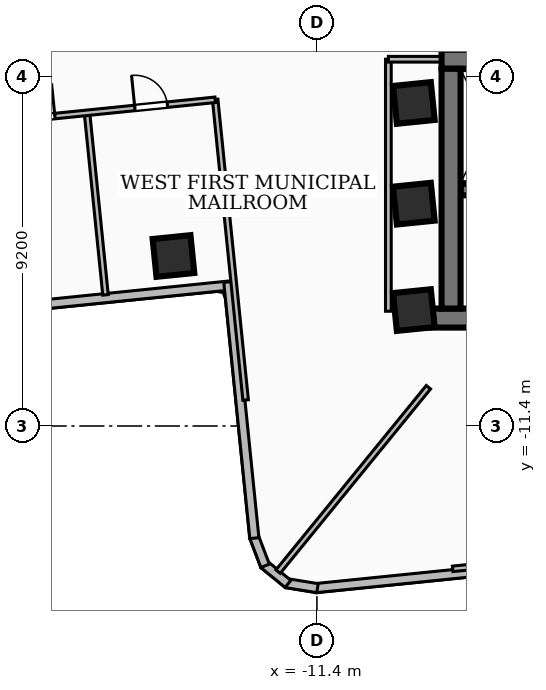
"""IFC4 building model, lengths in metres.
Left out: names, types, materials, properties, quantities, classifications, styles, units other than length and angle.
Written with IfcOpenShell. Run it as: python <this file> out.ifc"""

import sys

from ifc_helpers import new_model, si_unit, direction, frame, frame_2d, origin, origin_2d, place, context, subcontext, project, spatial, rectangle, extrude, element, fill, save


model = new_model("IFC4")
c1 = context("Model", 3, precision=1e-05, world=origin(), true_north=direction((0.0, 1.0)))
c2 = subcontext(c1, "Body", "Model", "MODEL_VIEW")
j1 = project(units=[si_unit("LENGTHUNIT", "METRE"), si_unit("PLANEANGLEUNIT", "RADIAN")], contexts=[c1])
p1 = place(None, origin())
s1 = spatial("IfcSite", under=j1, at=p1, CompositionType="ELEMENT")
p2 = place(p1, origin())
s2 = spatial("IfcBuilding", under=s1, at=p2, CompositionType="ELEMENT")
p3 = place(p2, frame((0.0, 0.0, 71.28)))
s3 = spatial("IfcBuildingStorey", under=s2, at=p3, CompositionType="ELEMENT", Elevation=71.28)
p4 = place(p3, frame((8.78, -8.56, 0.0), z_axis=(0.0, 0.0, 1.0), x_axis=(-1.0, 0.0, 0.0)))
e1 = element("IfcWall", 1, at=p4, inside=s3, PredefinedType="SHEAR", context=c2, shape_type="SweptSolid", body=[
    extrude(rectangle(XDim=17.56, YDim=0.5, at=frame_2d((8.78, 0.0))), origin(), (0.0, 0.0, 1.0), 3.34),
])
p5 = place(p3, frame((-8.12, -1.75, 0.0), z_axis=(0.0, 0.0, 1.0), x_axis=(1.0, 0.0, 0.0)))
e2 = element("IfcWall", 2, at=p5, inside=s3, PredefinedType="SHEAR", context=c2, shape_type="SweptSolid", body=[
    extrude(rectangle(XDim=16.24, YDim=0.5, at=frame_2d((8.12, 0.0))), origin(), (0.0, 0.0, 1.0), 3.34),
])
p6 = place(p5, frame((7.45, 0.0, 0.0)))
e3 = element("IfcOpeningElement", 3, at=p6, cuts=e2, PredefinedType="OPENING", context=c2, shape_type="SweptSolid", body=[
    extrude(rectangle(XDim=1.0, YDim=2.1, at=frame_2d((0.5, 1.05))), frame((0.0, 0.26, 0.0), z_axis=(0.0, -1.0, 0.0), x_axis=(1.0, 0.0, 0.0)), (0.0, 0.0, 1.0), 0.52),
])
p7 = place(p5, frame((10.965, 0.0, 0.0)))
e4 = element("IfcOpeningElement", 4, at=p7, cuts=e2, PredefinedType="OPENING", context=c2, shape_type="SweptSolid", body=[
    extrude(rectangle(XDim=1.05, YDim=2.15, at=frame_2d((0.525, 1.075))), frame((0.0, 0.26, 0.0), z_axis=(0.0, -1.0, 0.0), x_axis=(1.0, 0.0, 0.0)), (0.0, 0.0, 1.0), 0.52),
])
p8 = place(p5, frame((12.525, 0.0, 0.0)))
e5 = element("IfcOpeningElement", 5, at=p8, cuts=e2, PredefinedType="OPENING", context=c2, shape_type="SweptSolid", body=[
    extrude(rectangle(XDim=1.05, YDim=2.15, at=frame_2d((0.525, 1.075))), frame((0.0, 0.26, 0.0), z_axis=(0.0, -1.0, 0.0), x_axis=(1.0, 0.0, 0.0)), (0.0, 0.0, 1.0), 0.52),
])
p9 = place(p5, frame((14.085, 0.0, 0.0)))
e6 = element("IfcOpeningElement", 6, at=p9, cuts=e2, PredefinedType="OPENING", context=c2, shape_type="SweptSolid", body=[
    extrude(rectangle(XDim=1.05, YDim=2.15, at=frame_2d((0.525, 1.075))), frame((0.0, 0.26, 0.0), z_axis=(0.0, -1.0, 0.0), x_axis=(1.0, 0.0, 0.0)), (0.0, 0.0, 1.0), 0.52),
])
p10 = place(p3, frame((-7.87, -8.31, 0.0), z_axis=(0.0, 0.0, 1.0), x_axis=(0.0, 1.0, 0.0)))
e7 = element("IfcWall", 7, at=p10, inside=s3, PredefinedType="SHEAR", context=c2, shape_type="SweptSolid", body=[
    extrude(rectangle(XDim=6.31, YDim=0.5, at=frame_2d((3.155, 0.0))), origin(), (0.0, 0.0, 1.0), 3.34),
])
p11 = place(p3, frame((-7.62, -5.18, 0.0), z_axis=(0.0, 0.0, 1.0), x_axis=(1.0, 0.0, 0.0)))
e8 = element("IfcWall", 8, at=p11, inside=s3, PredefinedType="SOLIDWALL", context=c2, shape_type="SweptSolid", body=[
    extrude(rectangle(XDim=15.24, YDim=0.3, at=frame_2d((7.62, 0.0))), origin(), (0.0, 0.0, 1.0), 3.34),
])
p12 = place(p11, frame((5.77, 0.0, 0.0)))
e9 = element("IfcOpeningElement", 9, at=p12, cuts=e8, PredefinedType="OPENING", context=c2, shape_type="SweptSolid", body=[
    extrude(rectangle(XDim=1.1, YDim=2.15, at=frame_2d((0.55, 1.075))), frame((0.0, 0.16, 0.0), z_axis=(0.0, -1.0, 0.0), x_axis=(1.0, 0.0, 0.0)), (0.0, 0.0, 1.0), 0.32),
])
p13 = place(p11, frame((7.97, 0.0, 0.0)))
e10 = element("IfcOpeningElement", 10, at=p13, cuts=e8, PredefinedType="OPENING", context=c2, shape_type="SweptSolid", body=[
    extrude(rectangle(XDim=1.0, YDim=2.1, at=frame_2d((0.5, 1.05))), frame((0.0, 0.16, 0.0), z_axis=(0.0, -1.0, 0.0), x_axis=(1.0, 0.0, 0.0)), (0.0, 0.0, 1.0), 0.32),
])
for number, where, z_axis, x_axis in (
    (11, (-8.85, -5.55, 0.0), (0.0, 0.0, 1.0), (0.995, 0.101, 0.0)),
    (12, (-8.85, -2.9, 0.0), (0.0, 0.0, 1.0), (0.995, 0.101, 0.0)),
    (13, (-8.85, -8.35, 0.0), (0.0, 0.0, 1.0), (0.995, 0.101, 0.0)),
    (14, (-15.175, -6.927, 0.0), (0.0, 0.0, 1.0), (0.995, 0.101, 0.0)),
):
    element("IfcColumn", number, at=place(p3, frame(where, z_axis=z_axis, x_axis=x_axis)), inside=s3, PredefinedType="COLUMN", context=c2, shape_type="SweptSolid", body=[
        extrude(rectangle(XDim=1.0, YDim=1.0, at=origin_2d()), origin(), (0.0, 0.0, 1.0), 3.6),
    ])
p14 = place(p3, frame((-13.626, -7.696, 0.0), z_axis=(0.0, 0.0, 1.0), x_axis=(-0.994872930989, -0.101132839298, 0.0)))
e15 = element("IfcWall", 15, at=p14, inside=s3, PredefinedType="SOLIDWALL", context=c2, shape_type="SweptSolid", body=[
    extrude(rectangle(XDim=16.276, YDim=0.24, at=frame_2d((8.138, 0.0))), origin(), (0.0, 0.0, 1.0), 3.34),
])
p15 = place(p14, frame((12.775, 0.0, 0.85)))
e16 = element("IfcOpeningElement", 16, at=p15, cuts=e15, PredefinedType="OPENING", context=c2, shape_type="SweptSolid", body=[
    extrude(rectangle(XDim=2.4, YDim=1.85, at=frame_2d((1.2, 0.925))), frame((0.0, 0.13, 0.0), z_axis=(0.0, -1.0, 0.0), x_axis=(1.0, 0.0, 0.0)), (0.0, 0.0, 1.0), 0.26),
])
p16 = place(p3, frame((-4.694, -14.981, 0.0), z_axis=(0.0, 0.0, 1.0), x_axis=(-0.994875719665, -0.101105402534, 0.0)))
e17 = element("IfcWall", 17, at=p16, inside=s3, PredefinedType="SOLIDWALL", context=c2, shape_type="SweptSolid", body=[
    extrude(rectangle(XDim=6.776, YDim=0.24, at=frame_2d((3.388, 0.0))), origin(), (0.0, 0.0, 1.0), 2.486),
])
p17 = place(p3, frame((-11.385, -15.667, 0.0), z_axis=(0.0, 0.0, 1.0), x_axis=(-0.987091669755, 0.160156284613, 0.0)))
e18 = element("IfcWall", 18, at=p17, inside=s3, PredefinedType="SOLIDWALL", context=c2, shape_type="SweptSolid", body=[
    extrude(rectangle(XDim=0.831, YDim=0.24, at=frame_2d((0.416, 0.0))), origin(), (0.0, 0.0, 1.0), 3.34),
])
p18 = place(p3, frame((-12.161, -15.554, 0.0), z_axis=(0.0, 0.0, 1.0), x_axis=(-0.774946287969, 0.632027096542, 0.0)))
e19 = element("IfcWall", 19, at=p18, inside=s3, PredefinedType="SOLIDWALL", context=c2, shape_type="SweptSolid", body=[
    extrude(rectangle(XDim=0.813, YDim=0.24, at=frame_2d((0.407, 0.0))), origin(), (0.0, 0.0, 1.0), 3.34),
])
p19 = place(p3, frame((-12.763, -15.079, 0.0), z_axis=(0.0, 0.0, 1.0), x_axis=(-0.355469529522, 0.934687869602, 0.0)))
e20 = element("IfcWall", 20, at=p19, inside=s3, PredefinedType="SOLIDWALL", context=c2, shape_type="SweptSolid", body=[
    extrude(rectangle(XDim=0.83, YDim=0.24, at=frame_2d((0.415, 0.0))), origin(), (0.0, 0.0, 1.0), 3.34),
])
p20 = place(p3, frame((-13.046, -14.351, 0.0), z_axis=(0.0, 0.0, 1.0), x_axis=(-0.101248053545, 0.994861212257, 0.0)))
e21 = element("IfcWall", 21, at=p20, inside=s3, PredefinedType="SOLIDWALL", context=c2, shape_type="SweptSolid", body=[
    extrude(rectangle(XDim=6.776, YDim=0.24, at=frame_2d((3.388, 0.0))), origin(), (0.0, 0.0, 1.0), 3.34),
])
p21 = place(p3, frame((-9.52, -8.38, 0.0), z_axis=(0.0, 0.0, 1.0), x_axis=(0.0, 1.0, 0.0)))
e22 = element("IfcWall", 22, at=p21, inside=s3, PredefinedType="PARTITIONING", context=c2, shape_type="SweptSolid", body=[
    extrude(rectangle(XDim=6.63, YDim=0.15, at=frame_2d((3.315, 0.0))), origin(), (0.0, 0.0, 1.0), 2.486),
])
p22 = place(p3, frame((-7.85, -1.75, 0.0), z_axis=(0.0, 0.0, 1.0), x_axis=(-1.0, 0.0, 0.0)))
e23 = element("IfcWall", 23, at=p22, inside=s3, PredefinedType="PARTITIONING", context=c2, shape_type="SweptSolid", body=[
    extrude(rectangle(XDim=1.67, YDim=0.15, at=frame_2d((0.835, 0.0))), origin(), (0.0, 0.0, 1.0), 2.405),
])
p23 = place(p3, frame((-8.466, -10.38, 0.0), z_axis=(0.0, 0.0, 1.0), x_axis=(-0.631992375104, -0.774974604623, 0.0)))
e24 = element("IfcWall", 24, at=p23, inside=s3, PredefinedType="PARTITIONING", context=c2, shape_type="SweptSolid", body=[
    extrude(rectangle(XDim=6.26, YDim=0.145, at=frame_2d((3.13, 0.0))), origin(), (0.0, 0.0, 1.0), 3.34),
])
p24 = place(p3, frame((-14.078, -2.807, 0.0), z_axis=(0.0, 0.0, 1.0), x_axis=(0.100884076592, -0.994898187299, 0.0)))
e25 = element("IfcWall", 25, at=p24, inside=s3, PredefinedType="PARTITIONING", context=c2, shape_type="SweptSolid", body=[
    extrude(rectangle(XDim=7.95, YDim=0.145, at=frame_2d((3.975, 0.0))), origin(), (0.0, 0.0, 1.0), 2.486),
])
p25 = place(p3, frame((-17.448, -3.18, 0.0), z_axis=(0.0, 0.0, 1.0), x_axis=(0.101177373152, -0.994868402937, 0.0)))
e26 = element("IfcWall", 26, at=p25, inside=s3, PredefinedType="PARTITIONING", context=c2, shape_type="SweptSolid", body=[
    extrude(rectangle(XDim=4.795, YDim=0.145, at=frame_2d((2.397, 0.0))), origin(), (0.0, 0.0, 1.0), 2.486),
])
p26 = place(p3, frame((-19.997, -3.418, 0.0), z_axis=(0.0, 0.0, 1.0), x_axis=(0.994885342511, 0.101010669028, 0.0)))
e27 = element("IfcWall", 27, at=p26, inside=s3, PredefinedType="PARTITIONING", context=c2, shape_type="SweptSolid", body=[
    extrude(rectangle(XDim=5.951, YDim=0.145, at=frame_2d((2.975, 0.0))), origin(), (0.0, 0.0, 1.0), 3.34),
])
p27 = place(p26, frame((3.825, 0.0, 0.0)))
e28 = element("IfcOpeningElement", 28, at=p27, cuts=e27, PredefinedType="OPENING", context=c2, shape_type="SweptSolid", body=[
    extrude(rectangle(XDim=0.86, YDim=2.04, at=frame_2d((0.43, 1.02))), frame((0.0, 0.083, 0.0), z_axis=(0.0, -1.0, 0.0), x_axis=(1.0, 0.0, 0.0)), (0.0, 0.0, 1.0), 0.165),
])
p28 = place(p26, frame((0.85, 0.0, 0.0)))
e29 = element("IfcOpeningElement", 29, at=p28, cuts=e27, PredefinedType="OPENING", context=c2, shape_type="SweptSolid", body=[
    extrude(rectangle(XDim=0.86, YDim=2.04, at=frame_2d((0.43, 1.02))), frame((0.0, 0.083, 0.0), z_axis=(0.0, -1.0, 0.0), x_axis=(1.0, 0.0, 0.0)), (0.0, 0.0, 1.0), 0.165),
])
p29 = place(p3, frame((-7.828, -15.159, 0.0), z_axis=(0.0, 0.0, 1.0), x_axis=(0.994873184944, 0.101130341041, 0.0)))
e30 = element("IfcWall", 30, at=p29, inside=s3, PredefinedType="PARTITIONING", context=c2, shape_type="SweptSolid", body=[
    extrude(rectangle(XDim=7.95, YDim=0.145, at=frame_2d((3.975, 0.0))), origin(), (0.0, 0.0, 1.0), 2.486),
])
p30 = place(p27, origin())
e31 = element("IfcDoor", 31, at=p30, inside=s3, OperationType="SINGLE_SWING_LEFT", PredefinedType="DOOR", context=c2, shape_type="SweptSolid", body=[
    extrude(rectangle(XDim=0.86, YDim=2.04, at=frame_2d((0.43, 1.02))), frame((0.0, 0.025, 0.0), z_axis=(0.0, -1.0, 0.0), x_axis=(1.0, 0.0, 0.0)), (0.0, 0.0, 1.0), 0.05),
])
fill(e28, e31)
p31 = place(p28, origin())
e32 = element("IfcDoor", 32, at=p31, inside=s3, OperationType="SINGLE_SWING_RIGHT", PredefinedType="DOOR", context=c2, shape_type="SweptSolid", body=[
    extrude(rectangle(XDim=0.86, YDim=2.04, at=frame_2d((0.43, 1.02))), frame((0.0, 0.025, 0.0), z_axis=(0.0, -1.0, 0.0), x_axis=(1.0, 0.0, 0.0)), (0.0, 0.0, 1.0), 0.05),
])
fill(e29, e32)
save(model, sys.argv[1])
